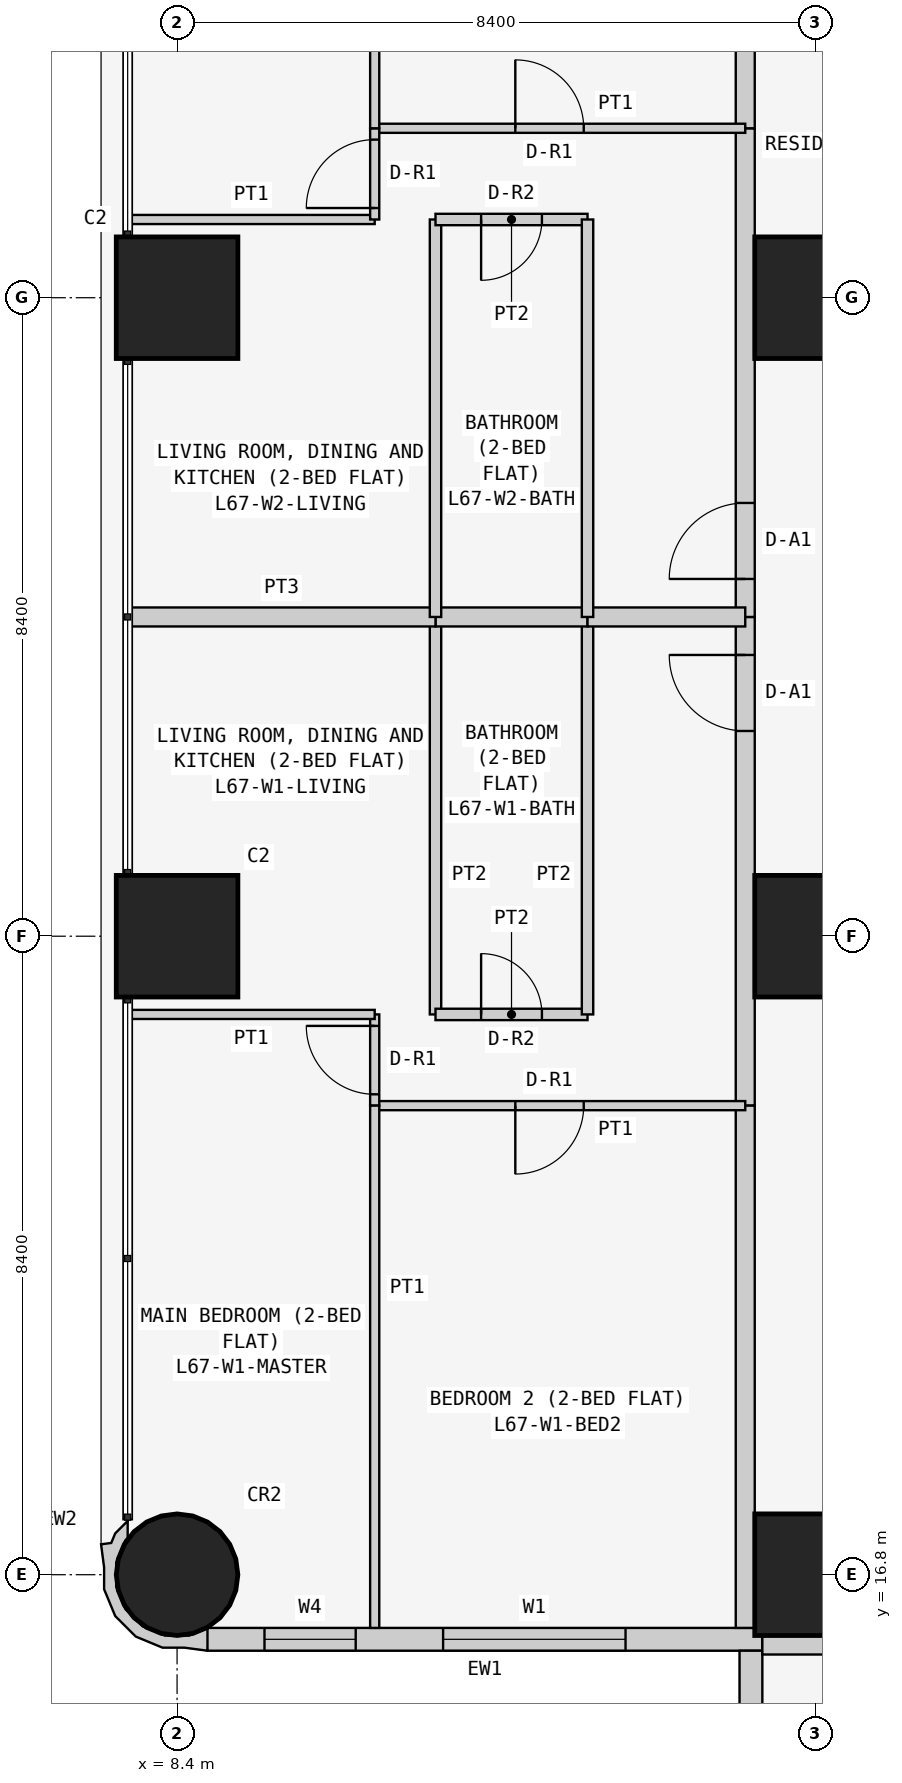
"""IFC4 building model, lengths in metres.
Left out: names, types, materials, properties, quantities, classifications, styles, units other than length and angle.
Written with IfcOpenShell. Run it as: python <this file> out.ifc"""

import sys

from ifc_helpers import new_model, si_unit, direction, frame, frame_2d, origin, origin_2d, place, context, subcontext, project, spatial, polyline, rectangle, circle, outline, extrude, element, fill, save


model = new_model("IFC4")
c1 = context("Model", 3, precision=1e-05, world=origin(), true_north=direction((0.0, 1.0)))
c2 = subcontext(c1, "Body", "Model", "MODEL_VIEW")
j1 = project(units=[si_unit("LENGTHUNIT", "METRE"), si_unit("PLANEANGLEUNIT", "RADIAN")], contexts=[c1])
p1 = place(None, origin())
s1 = spatial("IfcSite", under=j1, at=p1, CompositionType="ELEMENT")
p2 = place(p1, origin())
s2 = spatial("IfcBuilding", under=s1, at=p2, CompositionType="ELEMENT")
p3 = place(p2, frame((0.0, 0.0, 257.7)))
s3 = spatial("IfcBuildingStorey", under=s2, at=p3, CompositionType="ELEMENT", Elevation=257.7)
p4 = place(p3, frame((8.4, 16.8, 0.0), z_axis=(0.0, 0.0, 1.0), x_axis=(1.0, 0.0, 0.0)))
e1 = element("IfcColumn", 1, at=p4, inside=s3, PredefinedType="COLUMN", context=c2, shape_type="SweptSolid", body=[
    extrude(circle(Radius=0.8, at=origin_2d()), origin(), (0.0, 0.0, 1.0), 3.6),
])
for number, where, z_axis, x_axis in (
    (2, (8.4, 25.2, 0.0), (0.0, 0.0, 1.0), (1.0, 0.0, 0.0)),
    (3, (8.4, 33.6, 0.0), (0.0, 0.0, 1.0), (1.0, 0.0, 0.0)),
    (4, (16.8, 16.8, 0.0), (0.0, 0.0, 1.0), (1.0, 0.0, 0.0)),
    (5, (16.8, 25.2, 0.0), (0.0, 0.0, 1.0), (1.0, 0.0, 0.0)),
    (6, (16.8, 33.6, 0.0), (0.0, 0.0, 1.0), (1.0, 0.0, 0.0)),
):
    element("IfcColumn", number, at=place(p3, frame(where, z_axis=z_axis, x_axis=x_axis)), inside=s3, PredefinedType="COLUMN", context=c2, shape_type="SweptSolid", body=[
        extrude(rectangle(XDim=1.6, YDim=1.6, at=origin_2d()), origin(), (0.0, 0.0, 1.0), 3.6),
    ])
p5 = place(p3, frame((8.8, 15.95, 0.0), z_axis=(0.0, 0.0, 1.0), x_axis=(1.0, 0.0, 0.0)))
e7 = element("IfcWall", 7, at=p5, inside=s3, PredefinedType="SOLIDWALL", context=c2, shape_type="SweptSolid", body=[
    extrude(rectangle(XDim=7.3, YDim=0.3, at=frame_2d((3.65, 0.0))), origin(), (0.0, 0.0, 1.0), 3.45),
])
p6 = place(p5, frame((3.1, 0.0, 0.9)))
e8 = element("IfcOpeningElement", 8, at=p6, cuts=e7, PredefinedType="OPENING", context=c2, shape_type="SweptSolid", body=[
    extrude(rectangle(XDim=2.4, YDim=1.5, at=frame_2d((1.2, 0.75))), frame((0.0, 0.16, 0.0), z_axis=(0.0, -1.0, 0.0), x_axis=(1.0, 0.0, 0.0)), (0.0, 0.0, 1.0), 0.32),
])
p7 = place(p5, frame((0.75, 0.0, 0.9)))
e9 = element("IfcOpeningElement", 9, at=p7, cuts=e7, PredefinedType="OPENING", context=c2, shape_type="SweptSolid", body=[
    extrude(rectangle(XDim=1.2, YDim=1.5, at=frame_2d((0.6, 0.75))), frame((0.0, 0.16, 0.0), z_axis=(0.0, -1.0, 0.0), x_axis=(1.0, 0.0, 0.0)), (0.0, 0.0, 1.0), 0.32),
])
p8 = place(p3, frame((15.95, 15.8, 0.0), z_axis=(0.0, 0.0, 1.0), x_axis=(0.0, -1.0, 0.0)))
e10 = element("IfcWall", 10, at=p8, inside=s3, PredefinedType="SOLIDWALL", context=c2, shape_type="SweptSolid", body=[
    extrude(rectangle(XDim=7.0, YDim=0.3, at=frame_2d((3.5, 0.0))), origin(), (0.0, 0.0, 1.0), 3.45),
])
p9 = place(p8, frame((1.5, 0.0, 0.9)))
e11 = element("IfcOpeningElement", 11, at=p9, cuts=e10, PredefinedType="OPENING", context=c2, shape_type="SweptSolid", body=[
    extrude(rectangle(XDim=2.4, YDim=1.5, at=frame_2d((1.2, 0.75))), frame((0.0, 0.16, 0.0), z_axis=(0.0, -1.0, 0.0), x_axis=(1.0, 0.0, 0.0)), (0.0, 0.0, 1.0), 0.32),
])
p10 = place(p8, frame((5.05, 0.0, 0.9)))
e12 = element("IfcOpeningElement", 12, at=p10, cuts=e10, PredefinedType="OPENING", context=c2, shape_type="SweptSolid", body=[
    extrude(rectangle(XDim=1.2, YDim=1.5, at=frame_2d((0.6, 0.75))), frame((0.0, 0.16, 0.0), z_axis=(0.0, -1.0, 0.0), x_axis=(1.0, 0.0, 0.0)), (0.0, 0.0, 1.0), 0.32),
])
p11 = place(p3, frame((7.805, 17.448, 0.0), z_axis=(0.0, 0.0, 1.0), x_axis=(-0.93923434088, -0.343276641956, 0.0)))
e13 = element("IfcWall", 13, at=p11, inside=s3, PredefinedType="SOLIDWALL", context=c2, shape_type="SweptSolid", body=[
    extrude(outline(polyline([(-0.369, 1.89), (-0.509, 1.621), (-0.49, 1.614), (-0.479, 1.609), (-0.211, 1.62), (0.088, 1.511), (0.323, 1.295), (0.457, 1.006), (0.47, 0.688), (0.361, 0.389), (0.145, 0.154), (0.108, 0.137), (0.031, -0.075), (0.241, 0.023), (0.333, 0.124), (0.465, 0.094), (0.532, 0.393), (0.631, 0.663), (0.614, 1.045), (0.453, 1.391), (0.172, 1.649), (-0.097, 1.748), (-0.369, 1.89)])), origin(), (0.0, 0.0, 1.0), 3.45),
])
p12 = place(p3, frame((22.971, 15.875, 0.0), z_axis=(0.0, 0.0, 1.0), x_axis=(-1.0, 0.0, 0.0)))
e14 = element("IfcWall", 14, at=p12, inside=s3, PredefinedType="PARTITIONING", context=c2, shape_type="SweptSolid", body=[
    extrude(rectangle(XDim=6.871, YDim=0.25, at=frame_2d((3.436, 0.0))), origin(), (0.0, 0.0, 1.0), 3.45),
])
p13 = place(p3, frame((15.875, 22.971, 0.0), z_axis=(0.0, 0.0, 1.0), x_axis=(0.0, 1.0, 0.0)))
e15 = element("IfcWall", 15, at=p13, inside=s3, PredefinedType="PARTITIONING", context=c2, shape_type="SweptSolid", body=[
    extrude(rectangle(XDim=6.429, YDim=0.25, at=frame_2d((3.214, 0.0))), origin(), (0.0, 0.0, 1.0), 3.45),
])
p14 = place(p13, frame((4.929, 0.0, 0.0)))
e16 = element("IfcOpeningElement", 16, at=p14, cuts=e15, PredefinedType="OPENING", context=c2, shape_type="SweptSolid", body=[
    extrude(rectangle(XDim=1.0, YDim=2.1, at=frame_2d((0.5, 1.05))), frame((0.0, 0.135, 0.0), z_axis=(0.0, -1.0, 0.0), x_axis=(1.0, 0.0, 0.0)), (0.0, 0.0, 1.0), 0.27),
])
p15 = place(p3, frame((15.875, 16.1, 0.0), z_axis=(0.0, 0.0, 1.0), x_axis=(0.0, 1.0, 0.0)))
e17 = element("IfcWall", 17, at=p15, inside=s3, PredefinedType="PARTITIONING", context=c2, shape_type="SweptSolid", body=[
    extrude(rectangle(XDim=6.871, YDim=0.25, at=frame_2d((3.436, 0.0))), origin(), (0.0, 0.0, 1.0), 3.45),
])
p16 = place(p3, frame((15.875, 29.4, 0.0), z_axis=(0.0, 0.0, 1.0), x_axis=(0.0, 1.0, 0.0)))
e18 = element("IfcWall", 18, at=p16, inside=s3, PredefinedType="PARTITIONING", context=c2, shape_type="SweptSolid", body=[
    extrude(rectangle(XDim=6.429, YDim=0.25, at=frame_2d((3.215, 0.0))), origin(), (0.0, 0.0, 1.0), 3.45),
])
p17 = place(p16, frame((0.5, 0.0, 0.0)))
e19 = element("IfcOpeningElement", 19, at=p17, cuts=e18, PredefinedType="OPENING", context=c2, shape_type="SweptSolid", body=[
    extrude(rectangle(XDim=1.0, YDim=2.1, at=frame_2d((0.5, 1.05))), frame((0.0, 0.135, 0.0), z_axis=(0.0, -1.0, 0.0), x_axis=(1.0, 0.0, 0.0)), (0.0, 0.0, 1.0), 0.27),
])
p18 = place(p3, frame((15.875, 35.829, 0.0), z_axis=(0.0, 0.0, 1.0), x_axis=(0.0, 1.0, 0.0)))
e20 = element("IfcWall", 20, at=p18, inside=s3, PredefinedType="PARTITIONING", context=c2, shape_type="SweptSolid", body=[
    extrude(rectangle(XDim=6.871, YDim=0.25, at=frame_2d((3.436, 0.0))), origin(), (0.0, 0.0, 1.0), 3.45),
])
p19 = place(p3, frame((11.8, 29.4, 0.0), z_axis=(0.0, 0.0, 1.0), x_axis=(0.0, -1.0, 0.0)))
e21 = element("IfcWall", 21, at=p19, inside=s3, PredefinedType="PARTITIONING", context=c2, shape_type="SweptSolid", body=[
    extrude(rectangle(XDim=5.229, YDim=0.15, at=frame_2d((2.615, 0.0))), origin(), (0.0, 0.0, 1.0), 3.45),
])
p20 = place(p3, frame((11.8, 24.171, 0.0), z_axis=(0.0, 0.0, 1.0), x_axis=(1.0, 0.0, 0.0)))
e22 = element("IfcWall", 22, at=p20, inside=s3, PredefinedType="PARTITIONING", context=c2, shape_type="SweptSolid", body=[
    extrude(rectangle(XDim=2.0, YDim=0.15, at=frame_2d((1.0, 0.0))), origin(), (0.0, 0.0, 1.0), 3.45),
])
p21 = place(p20, frame((0.6, 0.0, 0.0)))
e23 = element("IfcOpeningElement", 23, at=p21, cuts=e22, PredefinedType="OPENING", context=c2, shape_type="SweptSolid", body=[
    extrude(rectangle(XDim=0.8, YDim=2.1, at=frame_2d((0.4, 1.05))), frame((0.0, 0.085, 0.0), z_axis=(0.0, -1.0, 0.0), x_axis=(1.0, 0.0, 0.0)), (0.0, 0.0, 1.0), 0.17),
])
p22 = place(p3, frame((13.8, 24.171, 0.0), z_axis=(0.0, 0.0, 1.0), x_axis=(0.0, 1.0, 0.0)))
e24 = element("IfcWall", 24, at=p22, inside=s3, PredefinedType="PARTITIONING", context=c2, shape_type="SweptSolid", body=[
    extrude(rectangle(XDim=5.229, YDim=0.15, at=frame_2d((2.615, 0.0))), origin(), (0.0, 0.0, 1.0), 3.45),
])
p23 = place(p3, frame((13.8, 29.4, 0.0), z_axis=(0.0, 0.0, 1.0), x_axis=(-1.0, 0.0, 0.0)))
e25 = element("IfcWall", 25, at=p23, inside=s3, PredefinedType="PARTITIONING", context=c2, shape_type="SweptSolid", body=[
    extrude(rectangle(XDim=2.0, YDim=0.25, at=frame_2d((1.0, 0.0))), origin(), (0.0, 0.0, 1.0), 3.45),
])
p24 = place(p3, frame((15.875, 22.971, 0.0), z_axis=(0.0, 0.0, 1.0), x_axis=(-1.0, 0.0, 0.0)))
e26 = element("IfcWall", 26, at=p24, inside=s3, PredefinedType="PARTITIONING", context=c2, shape_type="SweptSolid", body=[
    extrude(rectangle(XDim=4.875, YDim=0.12, at=frame_2d((2.438, 0.0))), origin(), (0.0, 0.0, 1.0), 3.45),
])
p25 = place(p24, frame((2.125, 0.0, 0.0)))
e27 = element("IfcOpeningElement", 27, at=p25, cuts=e26, PredefinedType="OPENING", context=c2, shape_type="SweptSolid", body=[
    extrude(rectangle(XDim=0.9, YDim=2.1, at=frame_2d((0.45, 1.05))), frame((0.0, 0.07, 0.0), z_axis=(0.0, -1.0, 0.0), x_axis=(1.0, 0.0, 0.0)), (0.0, 0.0, 1.0), 0.14),
])
p26 = place(p3, frame((11.0, 22.971, 0.0), z_axis=(0.0, 0.0, 1.0), x_axis=(0.0, 1.0, 0.0)))
e28 = element("IfcWall", 28, at=p26, inside=s3, PredefinedType="PARTITIONING", context=c2, shape_type="SweptSolid", body=[
    extrude(rectangle(XDim=1.2, YDim=0.12, at=frame_2d((0.6, 0.0))), origin(), (0.0, 0.0, 1.0), 3.45),
])
p27 = place(p26, frame((0.149, 0.0, 0.0)))
e29 = element("IfcOpeningElement", 29, at=p27, cuts=e28, PredefinedType="OPENING", context=c2, shape_type="SweptSolid", body=[
    extrude(rectangle(XDim=0.9, YDim=2.1, at=frame_2d((0.45, 1.05))), frame((0.0, 0.07, 0.0), z_axis=(0.0, -1.0, 0.0), x_axis=(1.0, 0.0, 0.0)), (0.0, 0.0, 1.0), 0.14),
])
p28 = place(p3, frame((11.0, 24.171, 0.0), z_axis=(0.0, 0.0, 1.0), x_axis=(-1.0, 0.0, 0.0)))
e30 = element("IfcWall", 30, at=p28, inside=s3, PredefinedType="PARTITIONING", context=c2, shape_type="SweptSolid", body=[
    extrude(rectangle(XDim=3.25, YDim=0.12, at=frame_2d((1.625, 0.0))), origin(), (0.0, 0.0, 1.0), 3.45),
])
p29 = place(p3, frame((7.75, 29.4, 0.0), z_axis=(0.0, 0.0, 1.0), x_axis=(1.0, 0.0, 0.0)))
e31 = element("IfcWall", 31, at=p29, inside=s3, PredefinedType="PARTITIONING", context=c2, shape_type="SweptSolid", body=[
    extrude(rectangle(XDim=4.05, YDim=0.25, at=frame_2d((2.025, 0.0))), origin(), (0.0, 0.0, 1.0), 3.45),
])
p30 = place(p3, frame((13.8, 29.4, 0.0), z_axis=(0.0, 0.0, 1.0), x_axis=(1.0, 0.0, 0.0)))
e32 = element("IfcWall", 32, at=p30, inside=s3, PredefinedType="PARTITIONING", context=c2, shape_type="SweptSolid", body=[
    extrude(rectangle(XDim=2.075, YDim=0.25, at=frame_2d((1.038, 0.0))), origin(), (0.0, 0.0, 1.0), 3.45),
])
p31 = place(p3, frame((11.0, 22.971, 0.0), z_axis=(0.0, 0.0, 1.0), x_axis=(0.0, -1.0, 0.0)))
e33 = element("IfcWall", 33, at=p31, inside=s3, PredefinedType="PARTITIONING", context=c2, shape_type="SweptSolid", body=[
    extrude(rectangle(XDim=6.871, YDim=0.12, at=frame_2d((3.436, 0.0))), origin(), (0.0, 0.0, 1.0), 3.45),
])
p32 = place(p3, frame((11.8, 29.4, 0.0), z_axis=(0.0, 0.0, 1.0), x_axis=(0.0, 1.0, 0.0)))
e34 = element("IfcWall", 34, at=p32, inside=s3, PredefinedType="PARTITIONING", context=c2, shape_type="SweptSolid", body=[
    extrude(rectangle(XDim=5.229, YDim=0.15, at=frame_2d((2.615, 0.0))), origin(), (0.0, 0.0, 1.0), 3.45),
])
p33 = place(p3, frame((11.8, 34.629, 0.0), z_axis=(0.0, 0.0, 1.0), x_axis=(1.0, 0.0, 0.0)))
e35 = element("IfcWall", 35, at=p33, inside=s3, PredefinedType="PARTITIONING", context=c2, shape_type="SweptSolid", body=[
    extrude(rectangle(XDim=2.0, YDim=0.15, at=frame_2d((1.0, 0.0))), origin(), (0.0, 0.0, 1.0), 3.45),
])
p34 = place(p33, frame((0.6, 0.0, 0.0)))
e36 = element("IfcOpeningElement", 36, at=p34, cuts=e35, PredefinedType="OPENING", context=c2, shape_type="SweptSolid", body=[
    extrude(rectangle(XDim=0.8, YDim=2.1, at=frame_2d((0.4, 1.05))), frame((0.0, 0.085, 0.0), z_axis=(0.0, -1.0, 0.0), x_axis=(1.0, 0.0, 0.0)), (0.0, 0.0, 1.0), 0.17),
])
p35 = place(p3, frame((13.8, 34.629, 0.0), z_axis=(0.0, 0.0, 1.0), x_axis=(0.0, -1.0, 0.0)))
e37 = element("IfcWall", 37, at=p35, inside=s3, PredefinedType="PARTITIONING", context=c2, shape_type="SweptSolid", body=[
    extrude(rectangle(XDim=5.229, YDim=0.15, at=frame_2d((2.615, 0.0))), origin(), (0.0, 0.0, 1.0), 3.45),
])
p36 = place(p3, frame((11.0, 35.829, 0.0), z_axis=(0.0, 0.0, 1.0), x_axis=(1.0, 0.0, 0.0)))
e38 = element("IfcWall", 38, at=p36, inside=s3, PredefinedType="PARTITIONING", context=c2, shape_type="SweptSolid", body=[
    extrude(rectangle(XDim=4.875, YDim=0.12, at=frame_2d((2.438, 0.0))), origin(), (0.0, 0.0, 1.0), 3.45),
])
p37 = place(p36, frame((1.85, 0.0, 0.0)))
e39 = element("IfcOpeningElement", 39, at=p37, cuts=e38, PredefinedType="OPENING", context=c2, shape_type="SweptSolid", body=[
    extrude(rectangle(XDim=0.9, YDim=2.1, at=frame_2d((0.45, 1.05))), frame((0.0, 0.07, 0.0), z_axis=(0.0, -1.0, 0.0), x_axis=(1.0, 0.0, 0.0)), (0.0, 0.0, 1.0), 0.14),
])
p38 = place(p3, frame((7.75, 34.629, 0.0), z_axis=(0.0, 0.0, 1.0), x_axis=(1.0, 0.0, 0.0)))
e40 = element("IfcWall", 40, at=p38, inside=s3, PredefinedType="PARTITIONING", context=c2, shape_type="SweptSolid", body=[
    extrude(rectangle(XDim=3.25, YDim=0.12, at=frame_2d((1.625, 0.0))), origin(), (0.0, 0.0, 1.0), 3.45),
])
p39 = place(p3, frame((11.0, 34.629, 0.0), z_axis=(0.0, 0.0, 1.0), x_axis=(0.0, 1.0, 0.0)))
e41 = element("IfcWall", 41, at=p39, inside=s3, PredefinedType="PARTITIONING", context=c2, shape_type="SweptSolid", body=[
    extrude(rectangle(XDim=1.2, YDim=0.12, at=frame_2d((0.6, 0.0))), origin(), (0.0, 0.0, 1.0), 3.45),
])
p40 = place(p39, frame((0.151, 0.0, 0.0)))
e42 = element("IfcOpeningElement", 42, at=p40, cuts=e41, PredefinedType="OPENING", context=c2, shape_type="SweptSolid", body=[
    extrude(rectangle(XDim=0.9, YDim=2.1, at=frame_2d((0.45, 1.05))), frame((0.0, 0.07, 0.0), z_axis=(0.0, -1.0, 0.0), x_axis=(1.0, 0.0, 0.0)), (0.0, 0.0, 1.0), 0.14),
])
p41 = place(p3, frame((11.0, 35.829, 0.0), z_axis=(0.0, 0.0, 1.0), x_axis=(0.0, 1.0, 0.0)))
e43 = element("IfcWall", 43, at=p41, inside=s3, PredefinedType="PARTITIONING", context=c2, shape_type="SweptSolid", body=[
    extrude(rectangle(XDim=6.871, YDim=0.12, at=frame_2d((3.436, 0.0))), origin(), (0.0, 0.0, 1.0), 3.45),
])
p42 = place(p6, origin())
e44 = element("IfcWindow", 44, at=p42, inside=s3, PartitioningType="SINGLE_PANEL", PredefinedType="WINDOW", context=c2, shape_type="SweptSolid", body=[
    extrude(rectangle(XDim=2.4, YDim=1.5, at=frame_2d((1.2, 0.75))), frame((0.0, 0.03, 0.0), z_axis=(0.0, -1.0, 0.0), x_axis=(1.0, 0.0, 0.0)), (0.0, 0.0, 1.0), 0.06),
])
fill(e8, e44)
p43 = place(p7, origin())
e45 = element("IfcWindow", 45, at=p43, inside=s3, PartitioningType="SINGLE_PANEL", PredefinedType="WINDOW", context=c2, shape_type="SweptSolid", body=[
    extrude(rectangle(XDim=1.2, YDim=1.5, at=frame_2d((0.6, 0.75))), frame((0.0, 0.03, 0.0), z_axis=(0.0, -1.0, 0.0), x_axis=(1.0, 0.0, 0.0)), (0.0, 0.0, 1.0), 0.06),
])
fill(e9, e45)
p44 = place(p14, origin())
e46 = element("IfcDoor", 46, at=p44, inside=s3, OperationType="SINGLE_SWING_RIGHT", PredefinedType="DOOR", context=c2, shape_type="SweptSolid", body=[
    extrude(rectangle(XDim=1.0, YDim=2.1, at=frame_2d((0.5, 1.05))), frame((0.0, 0.025, 0.0), z_axis=(0.0, -1.0, 0.0), x_axis=(1.0, 0.0, 0.0)), (0.0, 0.0, 1.0), 0.05),
])
fill(e16, e46)
p45 = place(p21, origin())
e47 = element("IfcDoor", 47, at=p45, inside=s3, OperationType="SINGLE_SWING_LEFT", PredefinedType="DOOR", context=c2, shape_type="SweptSolid", body=[
    extrude(rectangle(XDim=0.8, YDim=2.1, at=frame_2d((0.4, 1.05))), frame((0.0, 0.025, 0.0), z_axis=(0.0, -1.0, 0.0), x_axis=(1.0, 0.0, 0.0)), (0.0, 0.0, 1.0), 0.05),
])
fill(e23, e47)
p46 = place(p25, origin())
e48 = element("IfcDoor", 48, at=p46, inside=s3, OperationType="SINGLE_SWING_RIGHT", PredefinedType="DOOR", context=c2, shape_type="SweptSolid", body=[
    extrude(rectangle(XDim=0.9, YDim=2.1, at=frame_2d((0.45, 1.05))), frame((0.0, 0.025, 0.0), z_axis=(0.0, -1.0, 0.0), x_axis=(1.0, 0.0, 0.0)), (0.0, 0.0, 1.0), 0.05),
])
fill(e27, e48)
p47 = place(p27, origin())
e49 = element("IfcDoor", 49, at=p47, inside=s3, OperationType="SINGLE_SWING_RIGHT", PredefinedType="DOOR", context=c2, shape_type="SweptSolid", body=[
    extrude(rectangle(XDim=0.9, YDim=2.1, at=frame_2d((0.45, 1.05))), frame((0.0, 0.025, 0.0), z_axis=(0.0, -1.0, 0.0), x_axis=(1.0, 0.0, 0.0)), (0.0, 0.0, 1.0), 0.05),
])
fill(e29, e49)
p48 = place(p17, origin())
e50 = element("IfcDoor", 50, at=p48, inside=s3, OperationType="SINGLE_SWING_LEFT", PredefinedType="DOOR", context=c2, shape_type="SweptSolid", body=[
    extrude(rectangle(XDim=1.0, YDim=2.1, at=frame_2d((0.5, 1.05))), frame((0.0, 0.025, 0.0), z_axis=(0.0, -1.0, 0.0), x_axis=(1.0, 0.0, 0.0)), (0.0, 0.0, 1.0), 0.05),
])
fill(e19, e50)
p49 = place(p34, frame((0.8, 0.0, 0.0), z_axis=(0.0, 0.0, 1.0), x_axis=(-1.0, 0.0, 0.0)))
e51 = element("IfcDoor", 51, at=p49, inside=s3, OperationType="SINGLE_SWING_RIGHT", PredefinedType="DOOR", context=c2, shape_type="SweptSolid", body=[
    extrude(rectangle(XDim=0.8, YDim=2.1, at=frame_2d((0.4, 1.05))), frame((0.0, 0.025, 0.0), z_axis=(0.0, -1.0, 0.0), x_axis=(1.0, 0.0, 0.0)), (0.0, 0.0, 1.0), 0.05),
])
fill(e36, e51)
p50 = place(p37, origin())
e52 = element("IfcDoor", 52, at=p50, inside=s3, OperationType="SINGLE_SWING_LEFT", PredefinedType="DOOR", context=c2, shape_type="SweptSolid", body=[
    extrude(rectangle(XDim=0.9, YDim=2.1, at=frame_2d((0.45, 1.05))), frame((0.0, 0.025, 0.0), z_axis=(0.0, -1.0, 0.0), x_axis=(1.0, 0.0, 0.0)), (0.0, 0.0, 1.0), 0.05),
])
fill(e39, e52)
p51 = place(p40, origin())
e53 = element("IfcDoor", 53, at=p51, inside=s3, OperationType="SINGLE_SWING_LEFT", PredefinedType="DOOR", context=c2, shape_type="SweptSolid", body=[
    extrude(rectangle(XDim=0.9, YDim=2.1, at=frame_2d((0.45, 1.05))), frame((0.0, 0.025, 0.0), z_axis=(0.0, -1.0, 0.0), x_axis=(1.0, 0.0, 0.0)), (0.0, 0.0, 1.0), 0.05),
])
fill(e42, e53)
save(model, sys.argv[1])
